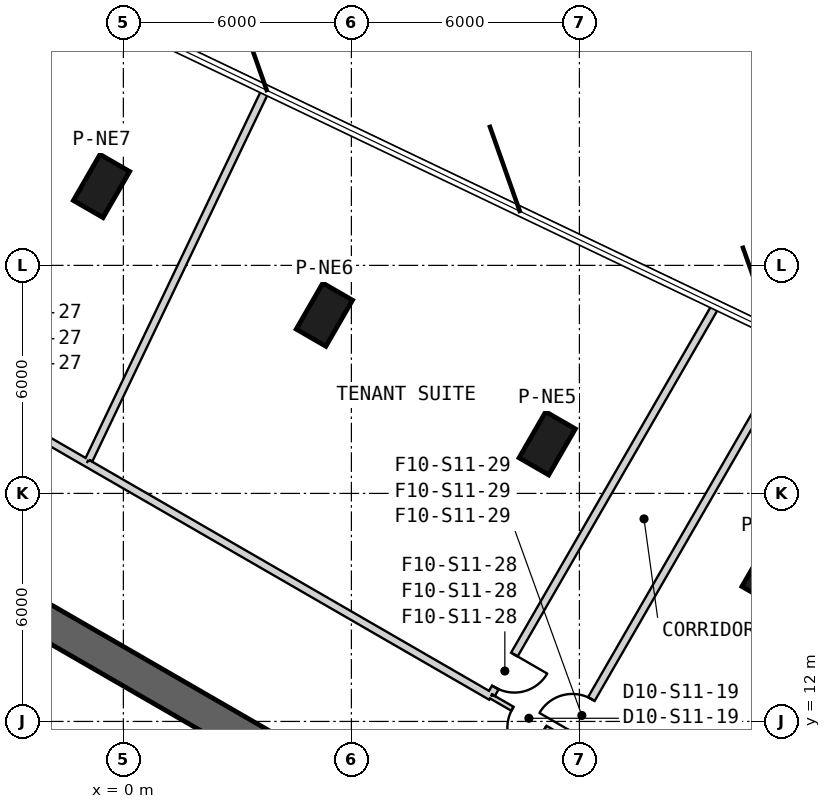
"""IFC4 building model, lengths in metres.
Left out: names, types, materials, properties, quantities, classifications, styles, units other than length and angle.
Written with IfcOpenShell. Run it as: python <this file> out.ifc"""

import sys

from ifc_helpers import new_model, si_unit, direction, frame, frame_2d, origin, origin_2d, place, context, subcontext, project, spatial, rectangle, extrude, element, fill, save


model = new_model("IFC4")
c1 = context("Model", 3, precision=1e-05, world=origin(), true_north=direction((0.0, 1.0)))
c2 = subcontext(c1, "Body", "Model", "MODEL_VIEW")
j1 = project(units=[si_unit("LENGTHUNIT", "METRE"), si_unit("PLANEANGLEUNIT", "RADIAN")], contexts=[c1])
p1 = place(None, origin())
s1 = spatial("IfcSite", under=j1, at=p1, CompositionType="ELEMENT")
p2 = place(p1, origin())
s2 = spatial("IfcBuilding", under=s1, at=p2, CompositionType="ELEMENT")
p3 = place(p2, frame((0.0, 0.0, 193.2)))
s3 = spatial("IfcBuildingStorey", under=s2, at=p3, CompositionType="ELEMENT", Elevation=193.2)
for number, where, z_axis, x_axis in (
    (1, (17.017, 15.932, 0.0), (0.0, 0.0, 1.0), (0.5, 0.866, 0.0)),
    (2, (11.153, 19.317, 0.0), (0.0, 0.0, 1.0), (0.5, 0.866, 0.0)),
    (3, (5.289, 22.703, 0.0), (0.0, 0.0, 1.0), (0.5, 0.866, 0.0)),
    (4, (-0.575, 26.088, 0.0), (0.0, 0.0, 1.0), (0.5, 0.866, 0.0)),
):
    element("IfcColumn", number, at=place(p3, frame(where, z_axis=z_axis, x_axis=x_axis)), inside=s3, PredefinedType="COLUMN", context=c2, shape_type="SweptSolid", body=[
        extrude(rectangle(XDim=1.4, YDim=0.9, at=origin_2d()), origin(), (0.0, 0.0, 1.0), 4.0),
    ])
p4 = place(p3, frame((19.475, 2.208, 0.0), z_axis=(0.0, 0.0, 1.0), x_axis=(-0.866028369851, 0.499994862586, 0.0)))
e5 = element("IfcWall", 5, at=p4, inside=s3, PredefinedType="SHEAR", context=c2, shape_type="SweptSolid", body=[
    extrude(rectangle(XDim=31.523, YDim=0.9, at=frame_2d((15.762, 0.0))), origin(), (0.0, 0.0, 1.0), 4.0),
])
p5 = place(p4, frame((7.062, 0.0, 0.0)))
e6 = element("IfcOpeningElement", 6, at=p5, cuts=e5, PredefinedType="OPENING", context=c2, shape_type="SweptSolid", body=[
    extrude(rectangle(XDim=1.2, YDim=2.4, at=frame_2d((0.6, 1.2))), frame((0.0, 0.46, 0.0), z_axis=(0.0, -1.0, 0.0), x_axis=(1.0, 0.0, 0.0)), (0.0, 0.0, 1.0), 0.92),
])
p6 = place(p4, frame((3.612, 0.0, 0.0)))
e7 = element("IfcOpeningElement", 7, at=p6, cuts=e5, PredefinedType="OPENING", context=c2, shape_type="SweptSolid", body=[
    extrude(rectangle(XDim=1.2, YDim=2.4, at=frame_2d((0.6, 1.2))), frame((0.0, 0.46, 0.0), z_axis=(0.0, -1.0, 0.0), x_axis=(1.0, 0.0, 0.0)), (0.0, 0.0, 1.0), 0.92),
])
p7 = place(p4, frame((26.712, 0.0, 0.0)))
e8 = element("IfcOpeningElement", 8, at=p7, cuts=e5, PredefinedType="OPENING", context=c2, shape_type="SweptSolid", body=[
    extrude(rectangle(XDim=1.2, YDim=2.4, at=frame_2d((0.6, 1.2))), frame((0.0, 0.46, 0.0), z_axis=(0.0, -1.0, 0.0), x_axis=(1.0, 0.0, 0.0)), (0.0, 0.0, 1.0), 0.92),
])
p8 = place(p3, frame((11.667, 11.508, 0.0), z_axis=(0.0, 0.0, 1.0), x_axis=(-0.866053019151, 0.499952165731, 0.0)))
e9 = element("IfcWall", 9, at=p8, inside=s3, PredefinedType="PARTITIONING", context=c2, shape_type="SweptSolid", body=[
    extrude(rectangle(XDim=2.3, YDim=0.12, at=frame_2d((1.15, 0.0))), origin(), (0.0, 0.0, 1.0), 3.7),
])
p9 = place(p8, frame((0.65, 0.0, 0.0)))
e10 = element("IfcOpeningElement", 10, at=p9, cuts=e9, PredefinedType="OPENING", context=c2, shape_type="SweptSolid", body=[
    extrude(rectangle(XDim=1.0, YDim=2.1, at=frame_2d((0.5, 1.05))), frame((0.0, 0.07, 0.0), z_axis=(0.0, -1.0, 0.0), x_axis=(1.0, 0.0, 0.0)), (0.0, 0.0, 1.0), 0.14),
])
p10 = place(p3, frame((9.675, 12.658, 0.0), z_axis=(0.0, 0.0, 1.0), x_axis=(-0.866018456403, 0.500012033024, 0.0)))
e11 = element("IfcWall", 11, at=p10, inside=s3, PredefinedType="PARTITIONING", context=c2, shape_type="SweptSolid", body=[
    extrude(rectangle(XDim=12.285, YDim=0.2, at=frame_2d((6.143, 0.0))), origin(), (0.0, 0.0, 1.0), 2.98),
])
p11 = place(p3, frame((-0.964, 18.801, 0.0), z_axis=(0.0, 0.0, 1.0), x_axis=(-0.866039032844, 0.499976393034, 0.0)))
e12 = element("IfcWall", 12, at=p11, inside=s3, PredefinedType="PARTITIONING", context=c2, shape_type="SweptSolid", body=[
    extrude(rectangle(XDim=6.158, YDim=0.2, at=frame_2d((3.079, 0.0))), origin(), (0.0, 0.0, 1.0), 2.88),
])
p12 = place(p11, frame((2.579, 0.0, 0.0)))
e13 = element("IfcOpeningElement", 13, at=p12, cuts=e12, PredefinedType="OPENING", context=c2, shape_type="SweptSolid", body=[
    extrude(rectangle(XDim=1.0, YDim=2.1, at=frame_2d((0.5, 1.05))), frame((0.0, 0.11, 0.0), z_axis=(0.0, -1.0, 0.0), x_axis=(1.0, 0.0, 0.0)), (0.0, 0.0, 1.0), 0.22),
])
p13 = place(p3, frame((15.599, 22.958, 0.0), z_axis=(0.0, 0.0, 1.0), x_axis=(-0.499990610615, -0.866030824681, 0.0)))
e14 = element("IfcWall", 14, at=p13, inside=s3, PredefinedType="PARTITIONING", context=c2, shape_type="SweptSolid", body=[
    extrude(rectangle(XDim=11.822, YDim=0.2, at=frame_2d((5.911, 0.0))), origin(), (0.0, 0.0, 1.0), 3.7),
])
p14 = place(p13, frame((10.621, 0.0, 0.0)))
e15 = element("IfcOpeningElement", 15, at=p14, cuts=e14, PredefinedType="OPENING", context=c2, shape_type="SweptSolid", body=[
    extrude(rectangle(XDim=1.0, YDim=2.1, at=frame_2d((0.5, 1.05))), frame((0.0, 0.11, 0.0), z_axis=(0.0, -1.0, 0.0), x_axis=(1.0, 0.0, 0.0)), (0.0, 0.0, 1.0), 0.22),
])
p15 = place(p3, frame((11.715, 11.55, 0.0), z_axis=(0.0, 0.0, 1.0), x_axis=(0.499988877688, 0.866031825159, 0.0)))
e16 = element("IfcWall", 16, at=p15, inside=s3, PredefinedType="PARTITIONING", context=c2, shape_type="SweptSolid", body=[
    extrude(rectangle(XDim=12.004, YDim=0.2, at=frame_2d((6.002, 0.0))), origin(), (0.0, 0.0, 1.0), 3.7),
])
p16 = place(p15, frame((0.2, 0.0, 0.0)))
e17 = element("IfcOpeningElement", 17, at=p16, cuts=e16, PredefinedType="OPENING", context=c2, shape_type="SweptSolid", body=[
    extrude(rectangle(XDim=1.0, YDim=2.1, at=frame_2d((0.5, 1.05))), frame((0.0, 0.11, 0.0), z_axis=(0.0, -1.0, 0.0), x_axis=(1.0, 0.0, 0.0)), (0.0, 0.0, 1.0), 0.22),
])
p17 = place(p3, frame((-0.906, 18.883, 0.0), z_axis=(0.0, 0.0, 1.0), x_axis=(0.431079223671, 0.90231408219, 0.0)))
e18 = element("IfcWall", 18, at=p17, inside=s3, PredefinedType="PARTITIONING", context=c2, shape_type="SweptSolid", body=[
    extrude(rectangle(XDim=10.792, YDim=0.2, at=frame_2d((5.396, 0.0))), origin(), (0.0, 0.0, 1.0), 2.98),
])
p18 = place(p9, origin())
e19 = element("IfcDoor", 19, at=p18, inside=s3, OperationType="SINGLE_SWING_LEFT", PredefinedType="NOTDEFINED", context=c2, shape_type="SweptSolid", body=[
    extrude(rectangle(XDim=1.0, YDim=2.1, at=frame_2d((0.5, 1.05))), frame((0.0, 0.025, 0.0), z_axis=(0.0, -1.0, 0.0), x_axis=(1.0, 0.0, 0.0)), (0.0, 0.0, 1.0), 0.05),
])
fill(e10, e19)
p19 = place(p14, origin())
e20 = element("IfcDoor", 20, at=p19, inside=s3, OperationType="SINGLE_SWING_RIGHT", PredefinedType="USERDEFINED", context=c2, shape_type="SweptSolid", body=[
    extrude(rectangle(XDim=1.0, YDim=2.1, at=frame_2d((0.5, 1.05))), frame((0.0, 0.025, 0.0), z_axis=(0.0, -1.0, 0.0), x_axis=(1.0, 0.0, 0.0)), (0.0, 0.0, 1.0), 0.05),
])
fill(e15, e20)
p20 = place(p16, origin())
e21 = element("IfcDoor", 21, at=p20, inside=s3, OperationType="SINGLE_SWING_RIGHT", PredefinedType="USERDEFINED", context=c2, shape_type="SweptSolid", body=[
    extrude(rectangle(XDim=1.0, YDim=2.1, at=frame_2d((0.5, 1.05))), frame((0.0, 0.025, 0.0), z_axis=(0.0, -1.0, 0.0), x_axis=(1.0, 0.0, 0.0)), (0.0, 0.0, 1.0), 0.05),
])
fill(e17, e21)
save(model, sys.argv[1])
